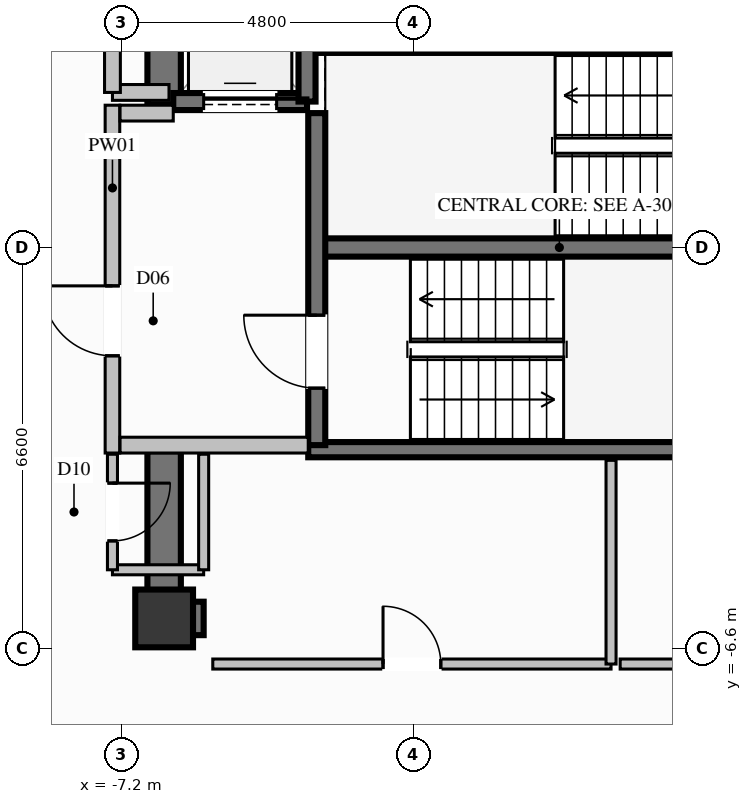
"""IFC4 building model, lengths in metres.
Left out: names, types, materials, properties, quantities, classifications, styles, units other than length and angle.
Written with IfcOpenShell. Run it as: python <this file> out.ifc"""

import sys

from ifc_helpers import new_model, si_unit, direction, frame, frame_2d, origin, origin_2d, place, context, subcontext, project, spatial, rectangle, extrude, element, fill, save


model = new_model("IFC4")
c1 = context("Model", 3, precision=1e-05, world=origin(), true_north=direction((0.0, 1.0)))
c2 = subcontext(c1, "Body", "Model", "MODEL_VIEW")
j1 = project(units=[si_unit("LENGTHUNIT", "METRE"), si_unit("PLANEANGLEUNIT", "RADIAN")], contexts=[c1])
p1 = place(None, origin())
s1 = spatial("IfcSite", under=j1, at=p1, CompositionType="ELEMENT")
p2 = place(p1, origin())
s2 = spatial("IfcBuilding", under=s1, at=p2, CompositionType="ELEMENT")
p3 = place(p2, frame((0.0, 0.0, 184.0)))
s3 = spatial("IfcBuildingStorey", under=s2, at=p3, CompositionType="ELEMENT", Elevation=184.0)
p4 = place(p3, frame((-6.5, -6.1, 0.0), z_axis=(0.0, 0.0, 1.0), x_axis=(1.0, 0.0, 0.0)))
e1 = element("IfcColumn", 1, at=p4, inside=s3, PredefinedType="COLUMN", context=c2, shape_type="SweptSolid", body=[
    extrude(rectangle(XDim=0.95, YDim=0.95, at=origin_2d()), origin(), (0.0, 0.0, 1.0), 3.6),
])
p5 = place(p3, frame((-3.99, 0.0, 0.0), z_axis=(0.0, 0.0, 1.0), x_axis=(1.0, 0.0, 0.0)))
e2 = element("IfcWall", 2, at=p5, inside=s3, PredefinedType="SHEAR", context=c2, shape_type="SweptSolid", body=[
    extrude(rectangle(XDim=7.98, YDim=0.3, at=frame_2d((3.99, 0.0))), origin(), (0.0, 0.0, 1.0), 3.6),
])
for number, where, z_axis, x_axis in (
    (3, (-4.13, -3.325, 0.0), (0.0, 0.0, 1.0), (1.0, 0.0, 0.0)),
    (4, (-4.13, 3.325, 0.0), (0.0, 0.0, 1.0), (1.0, 0.0, 0.0)),
):
    element("IfcWall", number, at=place(p3, frame(where, z_axis=z_axis, x_axis=x_axis)), inside=s3, PredefinedType="SOLIDWALL", context=c2, shape_type="SweptSolid", body=[
        extrude(rectangle(XDim=8.26, YDim=0.25, at=frame_2d((4.13, 0.0))), origin(), (0.0, 0.0, 1.0), 3.6),
    ])
p6 = place(p3, frame((-6.225, -6.1, 0.0), z_axis=(0.0, 0.0, 1.0), x_axis=(1.0, 0.0, 0.0)))
e5 = element("IfcWall", 5, at=p6, inside=s3, PredefinedType="SHEAR", context=c2, shape_type="SweptSolid", body=[
    extrude(rectangle(XDim=0.375, YDim=0.55, at=frame_2d((0.188, 0.0))), origin(), (0.0, 0.0, 1.0), 3.6),
])
p7 = place(p3, frame((-6.5, 2.35, 0.0), z_axis=(0.0, 0.0, 1.0), x_axis=(0.0, 1.0, 0.0)))
e6 = element("IfcWall", 6, at=p7, inside=s3, PredefinedType="SHEAR", context=c2, shape_type="SweptSolid", body=[
    extrude(rectangle(XDim=4.025, YDim=0.55, at=frame_2d((2.012, 0.0))), origin(), (0.0, 0.0, 1.0), 3.6),
])
p8 = place(p3, frame((-6.5, -6.375, 0.0), z_axis=(0.0, 0.0, 1.0), x_axis=(0.0, 1.0, 0.0)))
e7 = element("IfcWall", 7, at=p8, inside=s3, PredefinedType="SHEAR", context=c2, shape_type="SweptSolid", body=[
    extrude(rectangle(XDim=3.025, YDim=0.55, at=frame_2d((1.512, 0.0))), origin(), (0.0, 0.0, 1.0), 3.6),
])
p9 = place(p3, frame((-6.35, 2.4, 0.0), z_axis=(0.0, 0.0, 1.0), x_axis=(1.0, 0.0, 0.0)))
e8 = element("IfcWall", 8, at=p9, inside=s3, PredefinedType="SOLIDWALL", context=c2, shape_type="SweptSolid", body=[
    extrude(rectangle(XDim=2.2, YDim=0.28, at=frame_2d((1.1, 0.0))), origin(), (0.0, 0.0, 1.0), 3.36),
])
p10 = place(p9, frame((0.5, 0.0, 0.0)))
e9 = element("IfcOpeningElement", 9, at=p10, cuts=e8, PredefinedType="OPENING", context=c2, shape_type="SweptSolid", body=[
    extrude(rectangle(XDim=1.2, YDim=2.2, at=frame_2d((0.6, 1.1))), frame((0.0, 0.15, 0.0), z_axis=(0.0, -1.0, 0.0), x_axis=(1.0, 0.0, 0.0)), (0.0, 0.0, 1.0), 0.3),
])
p11 = place(p3, frame((-4.15, 2.4, 0.0), z_axis=(0.0, 0.0, 1.0), x_axis=(0.0, 1.0, 0.0)))
e10 = element("IfcWall", 10, at=p11, inside=s3, PredefinedType="SOLIDWALL", context=c2, shape_type="SweptSolid", body=[
    extrude(rectangle(XDim=2.7, YDim=0.28, at=frame_2d((1.35, 0.0))), origin(), (0.0, 0.0, 1.0), 3.36),
])
p12 = place(p3, frame((-3.99, -3.25, 0.0), z_axis=(0.0, 0.0, 1.0), x_axis=(0.0, 1.0, 0.0)))
e11 = element("IfcWall", 11, at=p12, inside=s3, PredefinedType="SOLIDWALL", context=c2, shape_type="SweptSolid", body=[
    extrude(rectangle(XDim=5.46, YDim=0.28, at=frame_2d((2.73, 0.0))), origin(), (0.0, 0.0, 1.0), 3.36),
])
p13 = place(p12, frame((0.937, 0.0, 0.0)))
e12 = element("IfcOpeningElement", 12, at=p13, cuts=e11, PredefinedType="OPENING", context=c2, shape_type="SweptSolid", body=[
    extrude(rectangle(XDim=1.2, YDim=2.2, at=frame_2d((0.6, 1.1))), frame((0.0, 0.15, 0.0), z_axis=(0.0, -1.0, 0.0), x_axis=(1.0, 0.0, 0.0)), (0.0, 0.0, 1.0), 0.3),
])
p14 = place(p3, frame((-7.35, -3.38, 0.0), z_axis=(0.0, 0.0, 1.0), x_axis=(0.0, 1.0, 0.0)))
e13 = element("IfcWall", 13, at=p14, inside=s3, PredefinedType="PARTITIONING", context=c2, shape_type="SweptSolid", body=[
    extrude(rectangle(XDim=5.72, YDim=0.24, at=frame_2d((2.86, 0.0))), origin(), (0.0, 0.0, 1.0), 2.445),
])
p15 = place(p14, frame((1.599, 0.0, 0.0)))
e14 = element("IfcOpeningElement", 14, at=p15, cuts=e13, PredefinedType="OPENING", context=c2, shape_type="SweptSolid", body=[
    extrude(rectangle(XDim=1.15, YDim=2.2, at=frame_2d((0.575, 1.1))), frame((0.0, 0.13, 0.0), z_axis=(0.0, -1.0, 0.0), x_axis=(1.0, 0.0, 0.0)), (0.0, 0.0, 1.0), 0.26),
])
p16 = place(p3, frame((-7.225, -3.25, 0.0), z_axis=(0.0, 0.0, 1.0), x_axis=(1.0, 0.0, 0.0)))
e15 = element("IfcWall", 15, at=p16, inside=s3, PredefinedType="PARTITIONING", context=c2, shape_type="SweptSolid", body=[
    extrude(rectangle(XDim=3.095, YDim=0.26, at=frame_2d((1.548, 0.0))), origin(), (0.0, 0.0, 1.0), 3.36),
])
p17 = place(p3, frame((-7.225, 2.21, 0.0), z_axis=(0.0, 0.0, 1.0), x_axis=(1.0, 0.0, 0.0)))
e16 = element("IfcWall", 16, at=p17, inside=s3, PredefinedType="PARTITIONING", context=c2, shape_type="SweptSolid", body=[
    extrude(rectangle(XDim=0.875, YDim=0.26, at=frame_2d((0.438, 0.0))), origin(), (0.0, 0.0, 1.0), 3.36),
])
p18 = place(p3, frame((-7.35, 2.55, 0.0), z_axis=(0.0, 0.0, 1.0), x_axis=(1.0, 0.0, 0.0)))
e17 = element("IfcWall", 17, at=p18, inside=s3, PredefinedType="PARTITIONING", context=c2, shape_type="SweptSolid", body=[
    extrude(rectangle(XDim=0.93, YDim=0.26, at=frame_2d((0.465, 0.0))), origin(), (0.0, 0.0, 1.0), 3.36),
])
p19 = place(p3, frame((-7.35, 2.55, 0.0), z_axis=(0.0, 0.0, 1.0), x_axis=(0.0, 1.0, 0.0)))
e18 = element("IfcWall", 18, at=p19, inside=s3, PredefinedType="PARTITIONING", context=c2, shape_type="SweptSolid", body=[
    extrude(rectangle(XDim=2.4, YDim=0.26, at=frame_2d((1.2, 0.0))), origin(), (0.0, 0.0, 1.0), 2.445),
])
p20 = place(p19, frame((0.775, 0.0, 0.0)))
e19 = element("IfcOpeningElement", 19, at=p20, cuts=e18, PredefinedType="OPENING", context=c2, shape_type="SweptSolid", body=[
    extrude(rectangle(XDim=0.85, YDim=2.05, at=frame_2d((0.425, 1.025))), frame((0.0, 0.14, 0.0), z_axis=(0.0, -1.0, 0.0), x_axis=(1.0, 0.0, 0.0)), (0.0, 0.0, 1.0), 0.28),
])
p21 = place(p3, frame((-7.35, -5.3, 0.0), z_axis=(0.0, 0.0, 1.0), x_axis=(1.0, 0.0, 0.0)))
e20 = element("IfcWall", 20, at=p21, inside=s3, PredefinedType="PARTITIONING", context=c2, shape_type="SweptSolid", body=[
    extrude(rectangle(XDim=1.5, YDim=0.165, at=frame_2d((0.75, 0.0))), origin(), (0.0, 0.0, 1.0), 2.445),
])
p22 = place(p3, frame((-5.85, -5.3, 0.0), z_axis=(0.0, 0.0, 1.0), x_axis=(0.0, 1.0, 0.0)))
e21 = element("IfcWall", 21, at=p22, inside=s3, PredefinedType="PARTITIONING", context=c2, shape_type="SweptSolid", body=[
    extrude(rectangle(XDim=1.9, YDim=0.165, at=frame_2d((0.95, 0.0))), origin(), (0.0, 0.0, 1.0), 2.445),
])
p23 = place(p3, frame((-7.35, -3.4, 0.0), z_axis=(0.0, 0.0, 1.0), x_axis=(0.0, -1.0, 0.0)))
e22 = element("IfcWall", 22, at=p23, inside=s3, PredefinedType="PARTITIONING", context=c2, shape_type="SweptSolid", body=[
    extrude(rectangle(XDim=1.9, YDim=0.165, at=frame_2d((0.95, 0.0))), origin(), (0.0, 0.0, 1.0), 3.36),
])
p24 = place(p23, frame((0.475, 0.0, 0.0)))
e23 = element("IfcOpeningElement", 23, at=p24, cuts=e22, PredefinedType="OPENING", context=c2, shape_type="SweptSolid", body=[
    extrude(rectangle(XDim=0.95, YDim=2.1, at=frame_2d((0.475, 1.05))), frame((0.0, 0.093, 0.0), z_axis=(0.0, -1.0, 0.0), x_axis=(1.0, 0.0, 0.0)), (0.0, 0.0, 1.0), 0.185),
])
p25 = place(p3, frame((-5.7, -6.85, 0.0), z_axis=(0.0, 0.0, 1.0), x_axis=(1.0, 0.0, 0.0)))
e24 = element("IfcWall", 24, at=p25, inside=s3, PredefinedType="PARTITIONING", context=c2, shape_type="SweptSolid", body=[
    extrude(rectangle(XDim=6.55, YDim=0.165, at=frame_2d((3.275, 0.0))), origin(), (0.0, 0.0, 1.0), 2.445),
])
p26 = place(p25, frame((2.8, 0.0, 0.0)))
e25 = element("IfcOpeningElement", 25, at=p26, cuts=e24, PredefinedType="OPENING", context=c2, shape_type="SweptSolid", body=[
    extrude(rectangle(XDim=0.95, YDim=2.1, at=frame_2d((0.475, 1.05))), frame((0.0, 0.093, 0.0), z_axis=(0.0, -1.0, 0.0), x_axis=(1.0, 0.0, 0.0)), (0.0, 0.0, 1.0), 0.185),
])
p27 = place(p3, frame((0.85, -6.85, 0.0), z_axis=(0.0, 0.0, 1.0), x_axis=(0.0, 1.0, 0.0)))
e26 = element("IfcWall", 26, at=p27, inside=s3, PredefinedType="PARTITIONING", context=c2, shape_type="SweptSolid", body=[
    extrude(rectangle(XDim=3.35, YDim=0.165, at=frame_2d((1.675, 0.0))), origin(), (0.0, 0.0, 1.0), 3.36),
])
p28 = place(p3, frame((1.0, -6.85, 0.0), z_axis=(0.0, 0.0, 1.0), x_axis=(1.0, 0.0, 0.0)))
e27 = element("IfcWall", 27, at=p28, inside=s3, PredefinedType="PARTITIONING", context=c2, shape_type="SweptSolid", body=[
    extrude(rectangle(XDim=2.95, YDim=0.165, at=frame_2d((1.475, 0.0))), origin(), (0.0, 0.0, 1.0), 2.445),
])
p29 = place(p28, frame((0.95, 0.0, 0.0)))
e28 = element("IfcOpeningElement", 28, at=p29, cuts=e27, PredefinedType="OPENING", context=c2, shape_type="SweptSolid", body=[
    extrude(rectangle(XDim=1.05, YDim=2.15, at=frame_2d((0.525, 1.075))), frame((0.0, 0.093, 0.0), z_axis=(0.0, -1.0, 0.0), x_axis=(1.0, 0.0, 0.0)), (0.0, 0.0, 1.0), 0.185),
])
p30 = place(p10, origin())
e29 = element("IfcDoor", 29, at=p30, inside=s3, OperationType="SLIDING_TO_LEFT", PredefinedType="DOOR", context=c2, shape_type="SweptSolid", body=[
    extrude(rectangle(XDim=1.2, YDim=2.2, at=frame_2d((0.6, 1.1))), frame((0.0, 0.025, 0.0), z_axis=(0.0, -1.0, 0.0), x_axis=(1.0, 0.0, 0.0)), (0.0, 0.0, 1.0), 0.05),
])
fill(e9, e29)
p31 = place(p13, origin())
e30 = element("IfcDoor", 30, at=p31, inside=s3, OperationType="SINGLE_SWING_RIGHT", PredefinedType="DOOR", context=c2, shape_type="SweptSolid", body=[
    extrude(rectangle(XDim=1.2, YDim=2.2, at=frame_2d((0.6, 1.1))), frame((0.0, 0.025, 0.0), z_axis=(0.0, -1.0, 0.0), x_axis=(1.0, 0.0, 0.0)), (0.0, 0.0, 1.0), 0.05),
])
fill(e12, e30)
p32 = place(p15, origin())
e31 = element("IfcDoor", 31, at=p32, inside=s3, OperationType="SINGLE_SWING_RIGHT", PredefinedType="DOOR", context=c2, shape_type="SweptSolid", body=[
    extrude(rectangle(XDim=1.15, YDim=2.2, at=frame_2d((0.575, 1.1))), frame((0.0, 0.025, 0.0), z_axis=(0.0, -1.0, 0.0), x_axis=(1.0, 0.0, 0.0)), (0.0, 0.0, 1.0), 0.05),
])
fill(e14, e31)
p33 = place(p24, origin())
e32 = element("IfcDoor", 32, at=p33, inside=s3, OperationType="SINGLE_SWING_LEFT", PredefinedType="DOOR", context=c2, shape_type="SweptSolid", body=[
    extrude(rectangle(XDim=0.95, YDim=2.1, at=frame_2d((0.475, 1.05))), frame((0.0, 0.025, 0.0), z_axis=(0.0, -1.0, 0.0), x_axis=(1.0, 0.0, 0.0)), (0.0, 0.0, 1.0), 0.05),
])
fill(e23, e32)
p34 = place(p26, origin())
e33 = element("IfcDoor", 33, at=p34, inside=s3, OperationType="SINGLE_SWING_LEFT", PredefinedType="DOOR", context=c2, shape_type="SweptSolid", body=[
    extrude(rectangle(XDim=0.95, YDim=2.1, at=frame_2d((0.475, 1.05))), frame((0.0, 0.025, 0.0), z_axis=(0.0, -1.0, 0.0), x_axis=(1.0, 0.0, 0.0)), (0.0, 0.0, 1.0), 0.05),
])
fill(e25, e33)
save(model, sys.argv[1])
